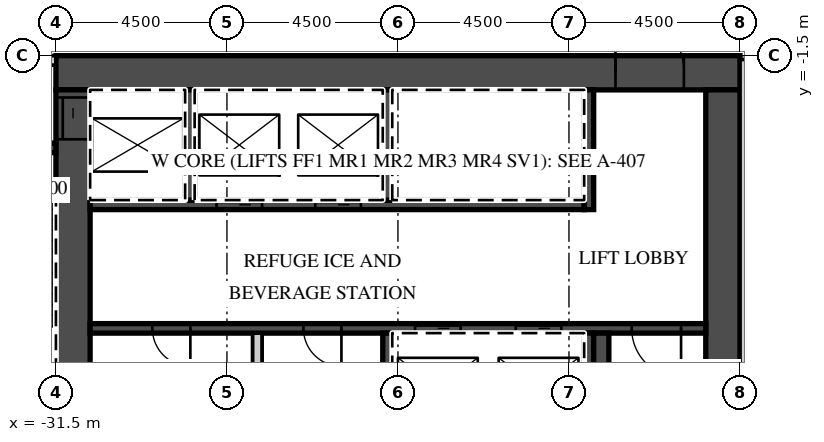
"""IFC4 building model, lengths in metres.
Left out: names, types, materials, properties, quantities, classifications, styles, units other than length and angle.
Written with IfcOpenShell. Run it as: python <this file> out.ifc"""

import sys

from ifc_helpers import new_model, si_unit, direction, frame, frame_2d, origin, place, context, subcontext, project, spatial, rectangle, extrude, element, fill, save


model = new_model("IFC4")
c1 = context("Model", 3, precision=1e-05, world=origin(), true_north=direction((0.0, 1.0)))
c2 = subcontext(c1, "Body", "Model", "MODEL_VIEW")
j1 = project(units=[si_unit("LENGTHUNIT", "METRE"), si_unit("PLANEANGLEUNIT", "RADIAN")], contexts=[c1])
p1 = place(None, origin())
s1 = spatial("IfcSite", under=j1, at=p1, CompositionType="ELEMENT")
p2 = place(p1, origin())
s2 = spatial("IfcBuilding", under=s1, at=p2, CompositionType="ELEMENT")
p3 = place(p2, frame((0.0, 0.0, 206.5)))
s3 = spatial("IfcBuildingStorey", under=s2, at=p3, CompositionType="ELEMENT", Elevation=206.5)
p4 = place(p3, frame((-31.5, -1.95, 0.0), z_axis=(0.0, 0.0, 1.0), x_axis=(1.0, 0.0, 0.0)))
e1 = element("IfcWall", 1, at=p4, inside=s3, PredefinedType="SHEAR", context=c2, shape_type="SweptSolid", body=[
    extrude(rectangle(XDim=18.0, YDim=0.9, at=frame_2d((9.0, 0.0))), origin(), (0.0, 0.0, 1.0), 4.2),
])
p5 = place(p4, frame((14.725, 0.0, 0.0)))
e2 = element("IfcOpeningElement", 2, at=p5, cuts=e1, PredefinedType="OPENING", context=c2, shape_type="SweptSolid", body=[
    extrude(rectangle(XDim=1.8, YDim=2.1, at=frame_2d((0.9, 1.05))), frame((0.0, 0.46, 0.0), z_axis=(0.0, -1.0, 0.0), x_axis=(1.0, 0.0, 0.0)), (0.0, 0.0, 1.0), 0.92),
])
p6 = place(p3, frame((-31.05, -15.2, 0.0), z_axis=(0.0, 0.0, 1.0), x_axis=(0.0, 1.0, 0.0)))
e3 = element("IfcWall", 3, at=p6, inside=s3, PredefinedType="SHEAR", context=c2, shape_type="SweptSolid", body=[
    extrude(rectangle(XDim=12.8, YDim=0.9, at=frame_2d((6.4, 0.0))), origin(), (0.0, 0.0, 1.0), 4.2),
])
p7 = place(p6, frame((11.5, 0.0, 0.0)))
e4 = element("IfcOpeningElement", 4, at=p7, cuts=e3, PredefinedType="OPENING", context=c2, shape_type="SweptSolid", body=[
    extrude(rectangle(XDim=1.1, YDim=2.1, at=frame_2d((0.55, 1.05))), frame((0.0, 0.46, 0.0), z_axis=(0.0, -1.0, 0.0), x_axis=(1.0, 0.0, 0.0)), (0.0, 0.0, 1.0), 0.92),
])
p8 = place(p3, frame((-13.95, -14.6, 0.0), z_axis=(0.0, 0.0, 1.0), x_axis=(0.0, 1.0, 0.0)))
e5 = element("IfcWall", 5, at=p8, inside=s3, PredefinedType="SHEAR", context=c2, shape_type="SweptSolid", body=[
    extrude(rectangle(XDim=12.2, YDim=0.9, at=frame_2d((6.1, 0.0))), origin(), (0.0, 0.0, 1.0), 4.2),
])
p9 = place(p3, frame((-30.6, -5.425, 0.0), z_axis=(0.0, 0.0, 1.0), x_axis=(1.0, 0.0, 0.0)))
e6 = element("IfcWall", 6, at=p9, inside=s3, PredefinedType="SHEAR", context=c2, shape_type="SweptSolid", body=[
    extrude(rectangle(XDim=13.0, YDim=0.25, at=frame_2d((6.5, 0.0))), origin(), (0.0, 0.0, 1.0), 4.2),
])
p10 = place(p9, frame((3.325, 0.0, 0.0)))
e7 = element("IfcOpeningElement", 7, at=p10, cuts=e6, PredefinedType="OPENING", context=c2, shape_type="SweptSolid", body=[
    extrude(rectangle(XDim=1.2, YDim=2.1, at=frame_2d((0.6, 1.05))), frame((0.0, 0.135, 0.0), z_axis=(0.0, -1.0, 0.0), x_axis=(1.0, 0.0, 0.0)), (0.0, 0.0, 1.0), 0.27),
])
p11 = place(p9, frame((5.925, 0.0, 0.0)))
e8 = element("IfcOpeningElement", 8, at=p11, cuts=e6, PredefinedType="OPENING", context=c2, shape_type="SweptSolid", body=[
    extrude(rectangle(XDim=1.2, YDim=2.1, at=frame_2d((0.6, 1.05))), frame((0.0, 0.135, 0.0), z_axis=(0.0, -1.0, 0.0), x_axis=(1.0, 0.0, 0.0)), (0.0, 0.0, 1.0), 0.27),
])
p12 = place(p3, frame((-17.475, -5.55, 0.0), z_axis=(0.0, 0.0, 1.0), x_axis=(0.0, 1.0, 0.0)))
e9 = element("IfcWall", 9, at=p12, inside=s3, PredefinedType="SHEAR", context=c2, shape_type="SweptSolid", body=[
    extrude(rectangle(XDim=3.15, YDim=0.25, at=frame_2d((1.575, 0.0))), origin(), (0.0, 0.0, 1.0), 4.2),
])
for number, where, z_axis, x_axis in (
    (10, (-27.975, -5.3, 0.0), (0.0, 0.0, 1.0), (0.0, 1.0, 0.0)),
    (11, (-22.775, -5.3, 0.0), (0.0, 0.0, 1.0), (0.0, 1.0, 0.0)),
):
    element("IfcWall", number, at=place(p3, frame(where, z_axis=z_axis, x_axis=x_axis)), inside=s3, PredefinedType="SHEAR", context=c2, shape_type="SweptSolid", body=[
        extrude(rectangle(XDim=2.9, YDim=0.25, at=frame_2d((1.45, 0.0))), origin(), (0.0, 0.0, 1.0), 4.2),
    ])
p13 = place(p3, frame((-30.6, -8.675, 0.0), z_axis=(0.0, 0.0, 1.0), x_axis=(1.0, 0.0, 0.0)))
e12 = element("IfcWall", 12, at=p13, inside=s3, PredefinedType="SHEAR", context=c2, shape_type="SweptSolid", body=[
    extrude(rectangle(XDim=16.2, YDim=0.25, at=frame_2d((8.1, 0.0))), origin(), (0.0, 0.0, 1.0), 4.2),
])
p14 = place(p13, frame((8.55, 0.0, 0.0)))
e13 = element("IfcOpeningElement", 13, at=p14, cuts=e12, PredefinedType="OPENING", context=c2, shape_type="SweptSolid", body=[
    extrude(rectangle(XDim=1.2, YDim=2.1, at=frame_2d((0.6, 1.05))), frame((0.0, 0.135, 0.0), z_axis=(0.0, -1.0, 0.0), x_axis=(1.0, 0.0, 0.0)), (0.0, 0.0, 1.0), 0.27),
])
p15 = place(p13, frame((11.2, 0.0, 0.0)))
e14 = element("IfcOpeningElement", 14, at=p15, cuts=e12, PredefinedType="OPENING", context=c2, shape_type="SweptSolid", body=[
    extrude(rectangle(XDim=1.2, YDim=2.1, at=frame_2d((0.6, 1.05))), frame((0.0, 0.135, 0.0), z_axis=(0.0, -1.0, 0.0), x_axis=(1.0, 0.0, 0.0)), (0.0, 0.0, 1.0), 0.27),
])
p16 = place(p13, frame((14.25, 0.0, 0.0)))
e15 = element("IfcOpeningElement", 15, at=p16, cuts=e12, PredefinedType="OPENING", context=c2, shape_type="SweptSolid", body=[
    extrude(rectangle(XDim=1.3, YDim=2.1, at=frame_2d((0.65, 1.05))), frame((0.0, 0.135, 0.0), z_axis=(0.0, -1.0, 0.0), x_axis=(1.0, 0.0, 0.0)), (0.0, 0.0, 1.0), 0.27),
])
p17 = place(p13, frame((1.637, 0.0, 0.0)))
e16 = element("IfcOpeningElement", 16, at=p17, cuts=e12, PredefinedType="OPENING", context=c2, shape_type="SweptSolid", body=[
    extrude(rectangle(XDim=1.0, YDim=2.1, at=frame_2d((0.5, 1.05))), frame((0.0, 0.135, 0.0), z_axis=(0.0, -1.0, 0.0), x_axis=(1.0, 0.0, 0.0)), (0.0, 0.0, 1.0), 0.27),
])
p18 = place(p13, frame((5.613, 0.0, 0.0)))
e17 = element("IfcOpeningElement", 17, at=p18, cuts=e12, PredefinedType="OPENING", context=c2, shape_type="SweptSolid", body=[
    extrude(rectangle(XDim=1.0, YDim=2.1, at=frame_2d((0.5, 1.05))), frame((0.0, 0.135, 0.0), z_axis=(0.0, -1.0, 0.0), x_axis=(1.0, 0.0, 0.0)), (0.0, 0.0, 1.0), 0.27),
])
for number, where, z_axis, x_axis in (
    (18, (-17.475, -11.7, 0.0), (0.0, 0.0, 1.0), (0.0, 1.0, 0.0)),
    (19, (-22.775, -11.7, 0.0), (0.0, 0.0, 1.0), (0.0, 1.0, 0.0)),
):
    element("IfcWall", number, at=place(p3, frame(where, z_axis=z_axis, x_axis=x_axis)), inside=s3, PredefinedType="SHEAR", context=c2, shape_type="SweptSolid", body=[
        extrude(rectangle(XDim=2.9, YDim=0.25, at=frame_2d((1.45, 0.0))), origin(), (0.0, 0.0, 1.0), 4.2),
    ])
p19 = place(p3, frame((-26.2, -11.7, 0.0), z_axis=(0.0, 0.0, 1.0), x_axis=(0.0, 1.0, 0.0)))
e20 = element("IfcWall", 20, at=p19, inside=s3, PredefinedType="PARTITIONING", context=c2, shape_type="SweptSolid", body=[
    extrude(rectangle(XDim=2.9, YDim=0.25, at=frame_2d((1.45, 0.0))), origin(), (0.0, 0.0, 1.0), 4.2),
])
p20 = place(p3, frame((-17.15, -14.6, 0.0), z_axis=(0.0, 0.0, 1.0), x_axis=(0.0, 1.0, 0.0)))
e21 = element("IfcWall", 21, at=p20, inside=s3, PredefinedType="SHEAR", context=c2, shape_type="SweptSolid", body=[
    extrude(rectangle(XDim=5.8, YDim=0.4, at=frame_2d((2.9, 0.0))), origin(), (0.0, 0.0, 1.0), 4.2),
])
p21 = place(p3, frame((-42.632, -1.625, 0.0), z_axis=(0.0, 0.0, 1.0), x_axis=(1.0, 0.0, 0.0)))
e22 = element("IfcWall", 22, at=p21, inside=s3, PredefinedType="PARTITIONING", context=c2, shape_type="SweptSolid", body=[
    extrude(rectangle(XDim=11.132, YDim=0.25, at=frame_2d((5.566, 0.0))), origin(), (0.0, 0.0, 1.0), 4.2),
])
p22 = place(p21, frame((9.207, 0.0, 0.0)))
e23 = element("IfcOpeningElement", 23, at=p22, cuts=e22, PredefinedType="OPENING", context=c2, shape_type="SweptSolid", body=[
    extrude(rectangle(XDim=1.3, YDim=2.1, at=frame_2d((0.65, 1.05))), frame((0.0, 0.135, 0.0), z_axis=(0.0, -1.0, 0.0), x_axis=(1.0, 0.0, 0.0)), (0.0, 0.0, 1.0), 0.27),
])
p23 = place(p21, frame((6.981, 0.0, 0.0)))
e24 = element("IfcOpeningElement", 24, at=p23, cuts=e22, PredefinedType="OPENING", context=c2, shape_type="SweptSolid", body=[
    extrude(rectangle(XDim=1.1, YDim=2.1, at=frame_2d((0.55, 1.05))), frame((0.0, 0.135, 0.0), z_axis=(0.0, -1.0, 0.0), x_axis=(1.0, 0.0, 0.0)), (0.0, 0.0, 1.0), 0.27),
])
p24 = place(p3, frame((-34.05, -3.925, 0.0), z_axis=(0.0, 0.0, 1.0), x_axis=(1.0, 0.0, 0.0)))
e25 = element("IfcWall", 25, at=p24, inside=s3, PredefinedType="SHEAR", context=c2, shape_type="SweptSolid", body=[
    extrude(rectangle(XDim=2.55, YDim=0.25, at=frame_2d((1.275, 0.0))), origin(), (0.0, 0.0, 1.0), 4.2),
])
p25 = place(p24, frame((0.625, 0.0, 0.0)))
e26 = element("IfcOpeningElement", 26, at=p25, cuts=e25, PredefinedType="OPENING", context=c2, shape_type="SweptSolid", body=[
    extrude(rectangle(XDim=1.3, YDim=2.1, at=frame_2d((0.65, 1.05))), frame((0.0, 0.135, 0.0), z_axis=(0.0, -1.0, 0.0), x_axis=(1.0, 0.0, 0.0)), (0.0, 0.0, 1.0), 0.27),
])
p26 = place(p3, frame((-13.4, -22.271, 0.0), z_axis=(0.0, 0.0, 1.0), x_axis=(0.0, 1.0, 0.0)))
e27 = element("IfcWall", 27, at=p26, inside=s3, PredefinedType="PARTITIONING", context=c2, shape_type="SweptSolid", body=[
    extrude(rectangle(XDim=20.671, YDim=0.2, at=frame_2d((10.336, 0.0))), origin(), (0.0, 0.0, 1.0), 4.2),
])
p27 = place(p14, origin())
e28 = element("IfcDoor", 28, at=p27, inside=s3, OperationType="SLIDING_TO_LEFT", PredefinedType="DOOR", context=c2, shape_type="SweptSolid", body=[
    extrude(rectangle(XDim=1.2, YDim=2.1, at=frame_2d((0.6, 1.05))), frame((0.0, 0.025, 0.0), z_axis=(0.0, -1.0, 0.0), x_axis=(1.0, 0.0, 0.0)), (0.0, 0.0, 1.0), 0.05),
])
fill(e13, e28)
p28 = place(p15, origin())
e29 = element("IfcDoor", 29, at=p28, inside=s3, OperationType="SLIDING_TO_RIGHT", PredefinedType="DOOR", context=c2, shape_type="SweptSolid", body=[
    extrude(rectangle(XDim=1.2, YDim=2.1, at=frame_2d((0.6, 1.05))), frame((0.0, 0.025, 0.0), z_axis=(0.0, -1.0, 0.0), x_axis=(1.0, 0.0, 0.0)), (0.0, 0.0, 1.0), 0.05),
])
fill(e14, e29)
p29 = place(p10, origin())
e30 = element("IfcDoor", 30, at=p29, inside=s3, OperationType="SLIDING_TO_RIGHT", PredefinedType="DOOR", context=c2, shape_type="SweptSolid", body=[
    extrude(rectangle(XDim=1.2, YDim=2.1, at=frame_2d((0.6, 1.05))), frame((0.0, 0.025, 0.0), z_axis=(0.0, -1.0, 0.0), x_axis=(1.0, 0.0, 0.0)), (0.0, 0.0, 1.0), 0.05),
])
fill(e7, e30)
p30 = place(p11, origin())
e31 = element("IfcDoor", 31, at=p30, inside=s3, OperationType="SLIDING_TO_RIGHT", PredefinedType="DOOR", context=c2, shape_type="SweptSolid", body=[
    extrude(rectangle(XDim=1.2, YDim=2.1, at=frame_2d((0.6, 1.05))), frame((0.0, 0.025, 0.0), z_axis=(0.0, -1.0, 0.0), x_axis=(1.0, 0.0, 0.0)), (0.0, 0.0, 1.0), 0.05),
])
fill(e8, e31)
p31 = place(p7, origin())
e32 = element("IfcDoor", 32, at=p31, inside=s3, OperationType="SLIDING_TO_RIGHT", PredefinedType="DOOR", context=c2, shape_type="SweptSolid", body=[
    extrude(rectangle(XDim=1.1, YDim=2.1, at=frame_2d((0.55, 1.05))), frame((0.0, 0.025, 0.0), z_axis=(0.0, -1.0, 0.0), x_axis=(1.0, 0.0, 0.0)), (0.0, 0.0, 1.0), 0.05),
])
fill(e4, e32)
p32 = place(p5, origin())
e33 = element("IfcDoor", 33, at=p32, inside=s3, OperationType="DOUBLE_DOOR_DOUBLE_SWING", PredefinedType="DOOR", context=c2, shape_type="SweptSolid", body=[
    extrude(rectangle(XDim=1.8, YDim=2.1, at=frame_2d((0.9, 1.05))), frame((0.0, 0.025, 0.0), z_axis=(0.0, -1.0, 0.0), x_axis=(1.0, 0.0, 0.0)), (0.0, 0.0, 1.0), 0.05),
])
fill(e2, e33)
p33 = place(p16, origin())
e34 = element("IfcDoor", 34, at=p33, inside=s3, OperationType="SINGLE_SWING_RIGHT", PredefinedType="DOOR", context=c2, shape_type="SweptSolid", body=[
    extrude(rectangle(XDim=1.3, YDim=2.1, at=frame_2d((0.65, 1.05))), frame((0.0, 0.025, 0.0), z_axis=(0.0, -1.0, 0.0), x_axis=(1.0, 0.0, 0.0)), (0.0, 0.0, 1.0), 0.05),
])
fill(e15, e34)
p34 = place(p17, origin())
e35 = element("IfcDoor", 35, at=p34, inside=s3, OperationType="SINGLE_SWING_RIGHT", PredefinedType="DOOR", context=c2, shape_type="SweptSolid", body=[
    extrude(rectangle(XDim=1.0, YDim=2.1, at=frame_2d((0.5, 1.05))), frame((0.0, 0.025, 0.0), z_axis=(0.0, -1.0, 0.0), x_axis=(1.0, 0.0, 0.0)), (0.0, 0.0, 1.0), 0.05),
])
fill(e16, e35)
p35 = place(p18, origin())
e36 = element("IfcDoor", 36, at=p35, inside=s3, OperationType="SINGLE_SWING_RIGHT", PredefinedType="DOOR", context=c2, shape_type="SweptSolid", body=[
    extrude(rectangle(XDim=1.0, YDim=2.1, at=frame_2d((0.5, 1.05))), frame((0.0, 0.025, 0.0), z_axis=(0.0, -1.0, 0.0), x_axis=(1.0, 0.0, 0.0)), (0.0, 0.0, 1.0), 0.05),
])
fill(e17, e36)
save(model, sys.argv[1])
